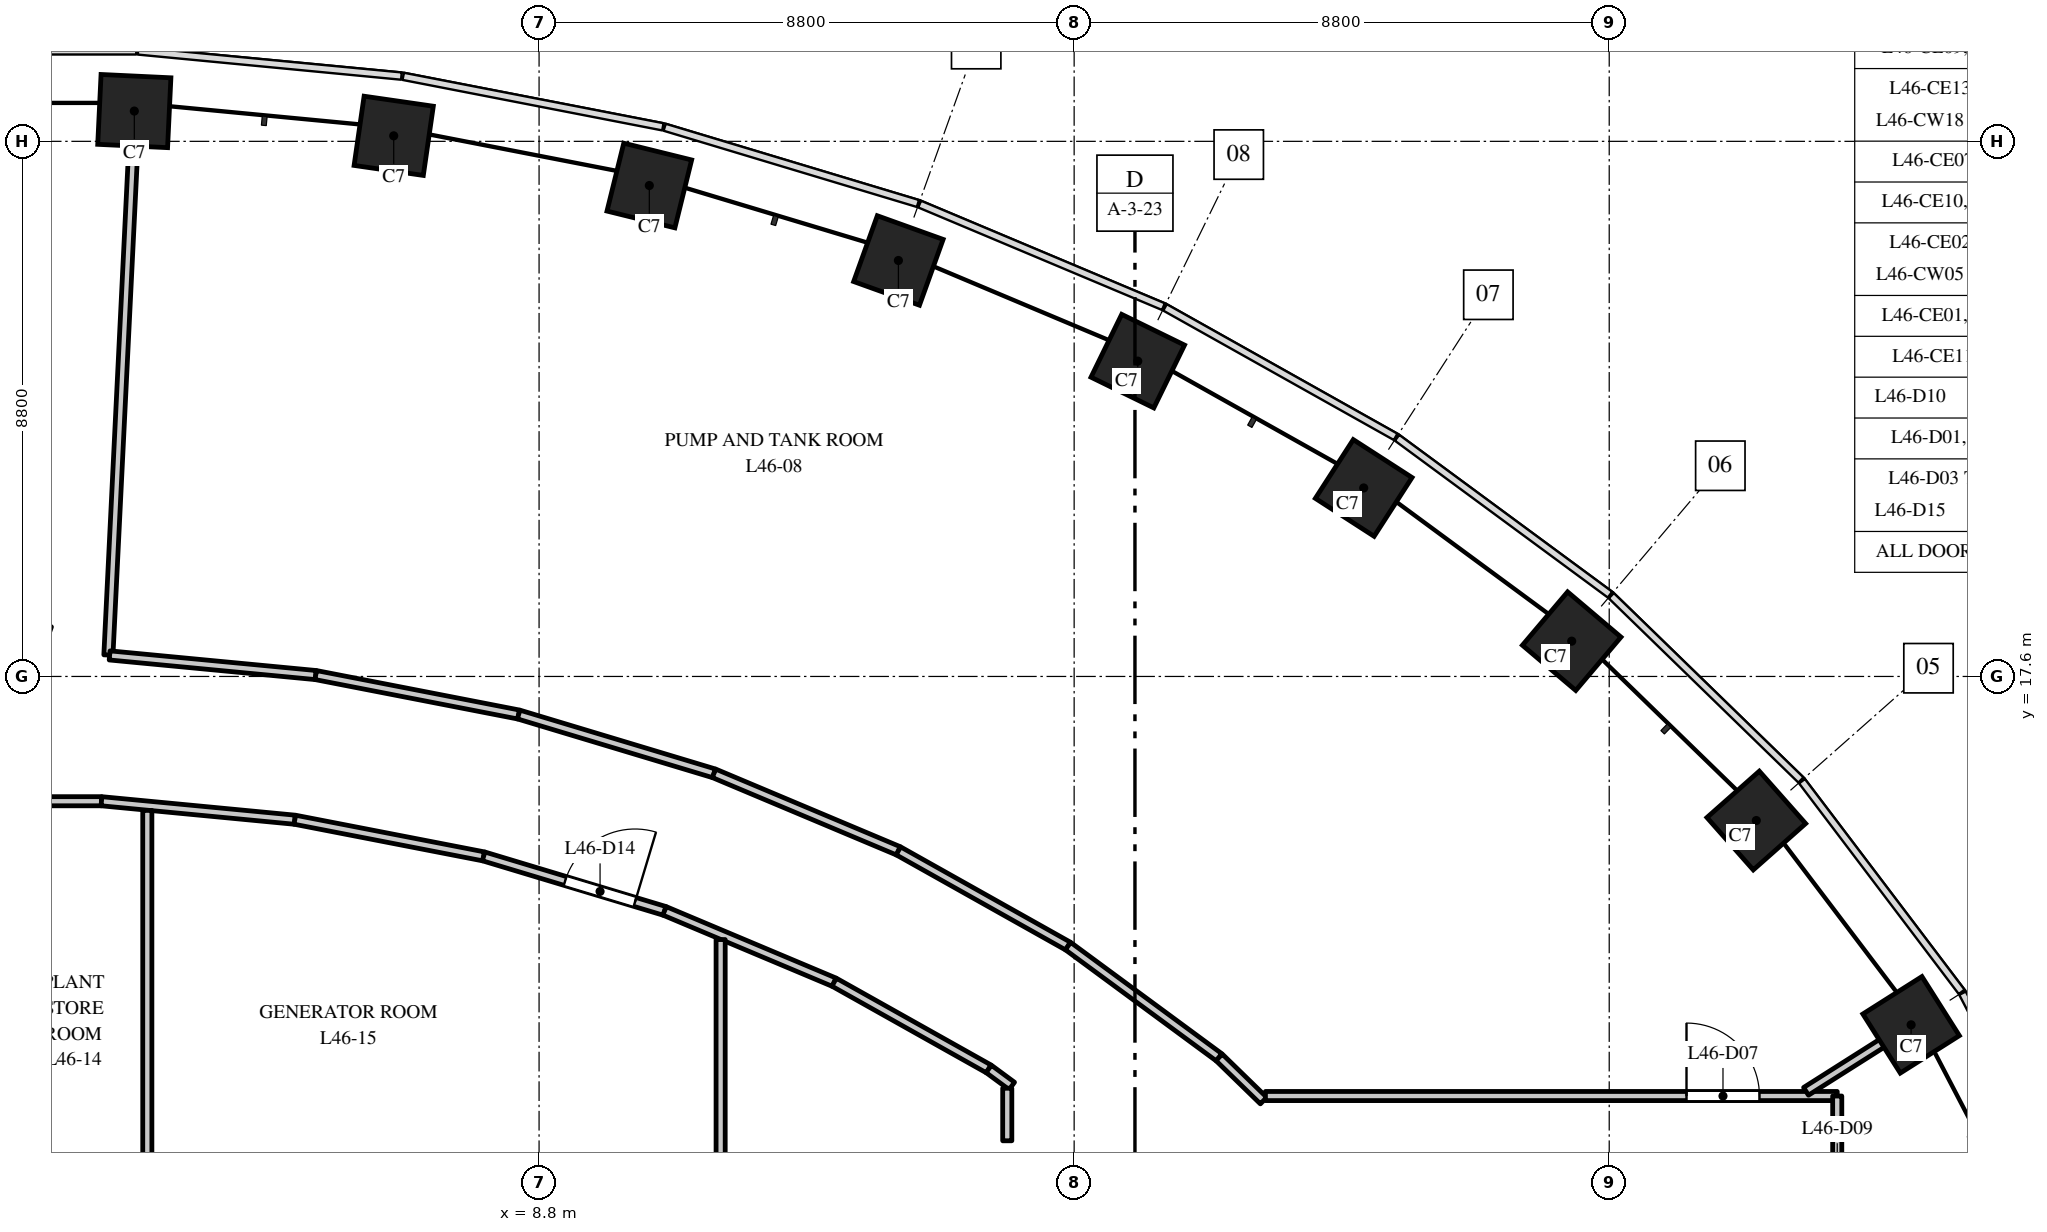
"""IFC4 building model, lengths in metres.
Left out: names, types, materials, properties, quantities, classifications, styles, units other than length and angle.
Written with IfcOpenShell. Run it as: python <this file> out.ifc"""

import sys

from ifc_helpers import new_model, si_unit, direction, frame, frame_2d, origin, origin_2d, place, context, subcontext, project, spatial, rectangle, extrude, element, fill, save


model = new_model("IFC4")
c1 = context("Model", 3, precision=1e-05, world=origin(), true_north=direction((0.0, 1.0)))
c2 = subcontext(c1, "Body", "Model", "MODEL_VIEW")
j1 = project(units=[si_unit("LENGTHUNIT", "METRE"), si_unit("PLANEANGLEUNIT", "RADIAN")], contexts=[c1])
p1 = place(None, origin())
s1 = spatial("IfcSite", under=j1, at=p1, CompositionType="ELEMENT")
p2 = place(p1, origin())
s2 = spatial("IfcBuilding", under=s1, at=p2, CompositionType="ELEMENT")
p3 = place(p2, frame((0.0, 0.0, 198.0)))
s3 = spatial("IfcBuildingStorey", under=s2, at=p3, CompositionType="ELEMENT", Elevation=198.0)
for number, where, z_axis, x_axis in (
    (1, (31.365, 11.871, 0.0), (0.0, 0.0, 1.0), (-0.535, 0.845, 0.0)),
    (2, (28.819, 15.23, 0.0), (0.0, 0.0, 1.0), (-0.663, 0.749, 0.0)),
    (3, (25.783, 18.18, 0.0), (0.0, 0.0, 1.0), (-0.763, 0.646, 0.0)),
    (4, (22.362, 20.7, 0.0), (0.0, 0.0, 1.0), (-0.84, 0.542, 0.0)),
    (5, (18.646, 22.785, 0.0), (0.0, 0.0, 1.0), (-0.898, 0.439, 0.0)),
    (6, (14.709, 24.441, 0.0), (0.0, 0.0, 1.0), (-0.941, 0.338, 0.0)),
    (7, (10.613, 25.674, 0.0), (0.0, 0.0, 1.0), (-0.971, 0.24, 0.0)),
    (8, (6.409, 26.491, 0.0), (0.0, 0.0, 1.0), (-0.99, 0.143, 0.0)),
    (9, (2.143, 26.898, 0.0), (0.0, 0.0, 1.0), (-0.999, 0.048, 0.0)),
):
    element("IfcColumn", number, at=place(p3, frame(where, z_axis=z_axis, x_axis=x_axis)), inside=s3, PredefinedType="COLUMN", context=c2, shape_type="SweptSolid", body=[
        extrude(rectangle(XDim=1.15, YDim=1.15, at=origin_2d()), origin(), (0.0, 0.0, 1.0), 5.5),
    ])
p4 = place(p3, frame((-1.603, 15.548, 0.0), z_axis=(0.0, 0.0, 1.0), x_axis=(1.0, 0.0, 0.0)))
e10 = element("IfcWall", 10, at=p4, inside=s3, PredefinedType="PARTITIONING", context=c2, shape_type="SweptSolid", body=[
    extrude(rectangle(XDim=3.206, YDim=0.15, at=frame_2d((1.603, 0.0))), origin(), (0.0, 0.0, 1.0), 4.3),
])
p5 = place(p4, frame((0.65, 0.0, 0.0)))
e11 = element("IfcOpeningElement", 11, at=p5, cuts=e10, PredefinedType="OPENING", context=c2, shape_type="SweptSolid", body=[
    extrude(rectangle(XDim=1.0, YDim=2.1, at=frame_2d((0.5, 1.05))), frame((0.0, 0.085, 0.0), z_axis=(0.0, -1.0, 0.0), x_axis=(1.0, 0.0, 0.0)), (0.0, 0.0, 1.0), 0.17),
])
p6 = place(p3, frame((1.603, 15.548, 0.0), z_axis=(0.0, 0.0, 1.0), x_axis=(0.995455539839, -0.095227455097, 0.0)))
e12 = element("IfcWall", 12, at=p6, inside=s3, PredefinedType="PARTITIONING", context=c2, shape_type="SweptSolid", body=[
    extrude(rectangle(XDim=3.194, YDim=0.15, at=frame_2d((1.597, 0.0))), origin(), (0.0, 0.0, 1.0), 4.3),
])
p7 = place(p3, frame((1.717, 17.952, 0.0), z_axis=(0.0, 0.0, 1.0), x_axis=(0.049011179308, 0.998798230026, 0.0)))
e13 = element("IfcWall", 13, at=p7, inside=s3, PredefinedType="PARTITIONING", context=c2, shape_type="SweptSolid", body=[
    extrude(rectangle(XDim=9.056, YDim=0.15, at=frame_2d((4.528, 0.0))), origin(), (0.0, 0.0, 1.0), 5.15),
])
p8 = place(p3, frame((1.737, 17.946, 0.0), z_axis=(0.0, 0.0, 1.0), x_axis=(0.995491282675, -0.094853076484, 0.0)))
e14 = element("IfcWall", 14, at=p8, inside=s3, PredefinedType="PARTITIONING", context=c2, shape_type="SweptSolid", body=[
    extrude(rectangle(XDim=3.405, YDim=0.15, at=frame_2d((1.703, 0.0))), origin(), (0.0, 0.0, 1.0), 4.3),
])
p9 = place(p3, frame((2.357, 7.21, 0.0), z_axis=(0.0, 0.0, 1.0), x_axis=(0.0, 1.0, 0.0)))
e15 = element("IfcWall", 15, at=p9, inside=s3, PredefinedType="PARTITIONING", context=c2, shape_type="SweptSolid", body=[
    extrude(rectangle(XDim=8.187, YDim=0.15, at=frame_2d((4.094, 0.0))), origin(), (0.0, 0.0, 1.0), 4.3),
])
p10 = place(p3, frame((4.783, 15.244, 0.0), z_axis=(0.0, 0.0, 1.0), x_axis=(0.981672390077, -0.190576280162, 0.0)))
e16 = element("IfcWall", 16, at=p10, inside=s3, PredefinedType="PARTITIONING", context=c2, shape_type="SweptSolid", body=[
    extrude(rectangle(XDim=3.163, YDim=0.15, at=frame_2d((1.582, 0.0))), origin(), (0.0, 0.0, 1.0), 5.15),
])
p11 = place(p3, frame((5.127, 17.623, 0.0), z_axis=(0.0, 0.0, 1.0), x_axis=(0.981613520879, -0.190879269771, 0.0)))
e17 = element("IfcWall", 17, at=p11, inside=s3, PredefinedType="PARTITIONING", context=c2, shape_type="SweptSolid", body=[
    extrude(rectangle(XDim=3.4, YDim=0.15, at=frame_2d((1.7, 0.0))), origin(), (0.0, 0.0, 1.0), 5.15),
])
p12 = place(p3, frame((7.888, 14.641, 0.0), z_axis=(0.0, 0.0, 1.0), x_axis=(0.957544770641, -0.28828460281, 0.0)))
e18 = element("IfcWall", 18, at=p12, inside=s3, PredefinedType="PARTITIONING", context=c2, shape_type="SweptSolid", body=[
    extrude(rectangle(XDim=3.108, YDim=0.15, at=frame_2d((1.554, 0.0))), origin(), (0.0, 0.0, 1.0), 4.3),
])
p13 = place(p12, frame((1.4, 0.0, 0.0)))
e19 = element("IfcOpeningElement", 19, at=p13, cuts=e18, PredefinedType="OPENING", context=c2, shape_type="SweptSolid", body=[
    extrude(rectangle(XDim=1.2, YDim=2.1, at=frame_2d((0.6, 1.05))), frame((0.0, 0.085, 0.0), z_axis=(0.0, -1.0, 0.0), x_axis=(1.0, 0.0, 0.0)), (0.0, 0.0, 1.0), 0.17),
])
p14 = place(p3, frame((8.464, 16.974, 0.0), z_axis=(0.0, 0.0, 1.0), x_axis=(0.957565546192, -0.28821558727, 0.0)))
e20 = element("IfcWall", 20, at=p14, inside=s3, PredefinedType="PARTITIONING", context=c2, shape_type="SweptSolid", body=[
    extrude(rectangle(XDim=3.355, YDim=0.15, at=frame_2d((1.678, 0.0))), origin(), (0.0, 0.0, 1.0), 4.3),
])
p15 = place(p3, frame((10.864, 13.745, 0.0), z_axis=(0.0, 0.0, 1.0), x_axis=(0.92178263598, -0.387707069843, 0.0)))
e21 = element("IfcWall", 21, at=p15, inside=s3, PredefinedType="PARTITIONING", context=c2, shape_type="SweptSolid", body=[
    extrude(rectangle(XDim=3.026, YDim=0.15, at=frame_2d((1.513, 0.0))), origin(), (0.0, 0.0, 1.0), 5.15),
])
p16 = place(p3, frame((11.677, 16.007, 0.0), z_axis=(0.0, 0.0, 1.0), x_axis=(0.921795970681, -0.387675364753, 0.0)))
e22 = element("IfcWall", 22, at=p16, inside=s3, PredefinedType="PARTITIONING", context=c2, shape_type="SweptSolid", body=[
    extrude(rectangle(XDim=3.289, YDim=0.15, at=frame_2d((1.645, 0.0))), origin(), (0.0, 0.0, 1.0), 5.15),
])
p17 = place(p3, frame((11.786, -13.273, 0.0), z_axis=(0.0, 0.0, 1.0), x_axis=(0.0, 1.0, 0.0)))
e23 = element("IfcWall", 23, at=p17, inside=s3, PredefinedType="PARTITIONING", context=c2, shape_type="SweptSolid", body=[
    extrude(rectangle(XDim=26.546, YDim=0.15, at=frame_2d((13.273, 0.0))), origin(), (0.0, 0.0, 1.0), 4.2),
])
p18 = place(p3, frame((13.653, 12.572, 0.0), z_axis=(0.0, 0.0, 1.0), x_axis=(0.872138682379, -0.48925874412, 0.0)))
e24 = element("IfcWall", 24, at=p18, inside=s3, PredefinedType="PARTITIONING", context=c2, shape_type="SweptSolid", body=[
    extrude(rectangle(XDim=2.915, YDim=0.15, at=frame_2d((1.457, 0.0))), origin(), (0.0, 0.0, 1.0), 5.15),
])
p19 = place(p3, frame((14.709, 14.732, 0.0), z_axis=(0.0, 0.0, 1.0), x_axis=(0.872039782413, -0.489434998635, 0.0)))
e25 = element("IfcWall", 25, at=p19, inside=s3, PredefinedType="PARTITIONING", context=c2, shape_type="SweptSolid", body=[
    extrude(rectangle(XDim=3.199, YDim=0.15, at=frame_2d((1.6, 0.0))), origin(), (0.0, 0.0, 1.0), 5.15),
])
p20 = place(p3, frame((16.195, 11.146, 0.0), z_axis=(0.0, 0.0, 1.0), x_axis=(0.804938799391, -0.593357842482, 0.0)))
e26 = element("IfcWall", 26, at=p20, inside=s3, PredefinedType="PARTITIONING", context=c2, shape_type="SweptSolid", body=[
    extrude(rectangle(XDim=0.472, YDim=0.15, at=frame_2d((0.236, 0.0))), origin(), (0.0, 0.0, 1.0), 5.15),
])
p21 = place(p3, frame((16.5, 9.964, 0.0), z_axis=(0.0, 0.0, 1.0), x_axis=(0.0, 1.0, 0.0)))
e27 = element("IfcWall", 27, at=p21, inside=s3, PredefinedType="PARTITIONING", context=c2, shape_type="SweptSolid", body=[
    extrude(rectangle(XDim=0.864, YDim=0.15, at=frame_2d((0.432, 0.0))), origin(), (0.0, 0.0, 1.0), 5.15),
])
p22 = place(p3, frame((17.499, 13.166, 0.0), z_axis=(0.0, 0.0, 1.0), x_axis=(0.805191029373, -0.593015519373, 0.0)))
e28 = element("IfcWall", 28, at=p22, inside=s3, PredefinedType="PARTITIONING", context=c2, shape_type="SweptSolid", body=[
    extrude(rectangle(XDim=3.086, YDim=0.15, at=frame_2d((1.543, 0.0))), origin(), (0.0, 0.0, 1.0), 5.15),
])
p23 = place(p3, frame((19.984, 11.336, 0.0), z_axis=(0.0, 0.0, 1.0), x_axis=(0.716971653665, -0.697102322361, 0.0)))
e29 = element("IfcWall", 29, at=p23, inside=s3, PredefinedType="PARTITIONING", context=c2, shape_type="SweptSolid", body=[
    extrude(rectangle(XDim=1.02, YDim=0.15, at=frame_2d((0.51, 0.0))), origin(), (0.0, 0.0, 1.0), 4.2),
])
p24 = place(p3, frame((20.746, 10.7, 0.0), z_axis=(0.0, 0.0, 1.0), x_axis=(1.0, 0.0, 0.0)))
e30 = element("IfcWall", 30, at=p24, inside=s3, PredefinedType="PARTITIONING", context=c2, shape_type="SweptSolid", body=[
    extrude(rectangle(XDim=9.404, YDim=0.15, at=frame_2d((4.702, 0.0))), origin(), (0.0, 0.0, 1.0), 5.15),
])
p25 = place(p24, frame((6.925, 0.0, 0.0)))
e31 = element("IfcOpeningElement", 31, at=p25, cuts=e30, PredefinedType="OPENING", context=c2, shape_type="SweptSolid", body=[
    extrude(rectangle(XDim=1.2, YDim=2.1, at=frame_2d((0.6, 1.05))), frame((0.0, 0.085, 0.0), z_axis=(0.0, -1.0, 0.0), x_axis=(1.0, 0.0, 0.0)), (0.0, 0.0, 1.0), 0.17),
])
p26 = place(p3, frame((29.637, 10.777, 0.0), z_axis=(0.0, 0.0, 1.0), x_axis=(0.844747041197, 0.535165802709, 0.0)))
e32 = element("IfcWall", 32, at=p26, inside=s3, PredefinedType="PARTITIONING", context=c2, shape_type="SweptSolid", body=[
    extrude(rectangle(XDim=2.145, YDim=0.15, at=frame_2d((1.073, 0.0))), origin(), (0.0, 0.0, 1.0), 5.15),
])
p27 = place(p3, frame((30.15, 8.5, 0.0), z_axis=(0.0, 0.0, 1.0), x_axis=(0.0, 1.0, 0.0)))
e33 = element("IfcWall", 33, at=p27, inside=s3, PredefinedType="PARTITIONING", context=c2, shape_type="SweptSolid", body=[
    extrude(rectangle(XDim=2.2, YDim=0.15, at=frame_2d((1.1, 0.0))), origin(), (0.0, 0.0, 1.0), 5.15),
])
p28 = place(p27, frame((0.15, 0.0, 0.0)))
e34 = element("IfcOpeningElement", 34, at=p28, cuts=e33, PredefinedType="OPENING", context=c2, shape_type="SweptSolid", body=[
    extrude(rectangle(XDim=1.0, YDim=2.1, at=frame_2d((0.5, 1.05))), frame((0.0, 0.085, 0.0), z_axis=(0.0, -1.0, 0.0), x_axis=(1.0, 0.0, 0.0)), (0.0, 0.0, 1.0), 0.17),
])
p29 = place(p25, origin())
e35 = element("IfcDoor", 35, at=p29, inside=s3, OperationType="SINGLE_SWING_LEFT", PredefinedType="DOOR", context=c2, shape_type="SweptSolid", body=[
    extrude(rectangle(XDim=1.2, YDim=2.1, at=frame_2d((0.6, 1.05))), frame((0.0, 0.025, 0.0), z_axis=(0.0, -1.0, 0.0), x_axis=(1.0, 0.0, 0.0)), (0.0, 0.0, 1.0), 0.05),
])
fill(e31, e35)
p30 = place(p13, origin())
e36 = element("IfcDoor", 36, at=p30, inside=s3, OperationType="SINGLE_SWING_RIGHT", PredefinedType="DOOR", context=c2, shape_type="SweptSolid", body=[
    extrude(rectangle(XDim=1.2, YDim=2.1, at=frame_2d((0.6, 1.05))), frame((0.0, 0.025, 0.0), z_axis=(0.0, -1.0, 0.0), x_axis=(1.0, 0.0, 0.0)), (0.0, 0.0, 1.0), 0.05),
])
fill(e19, e36)
save(model, sys.argv[1])
